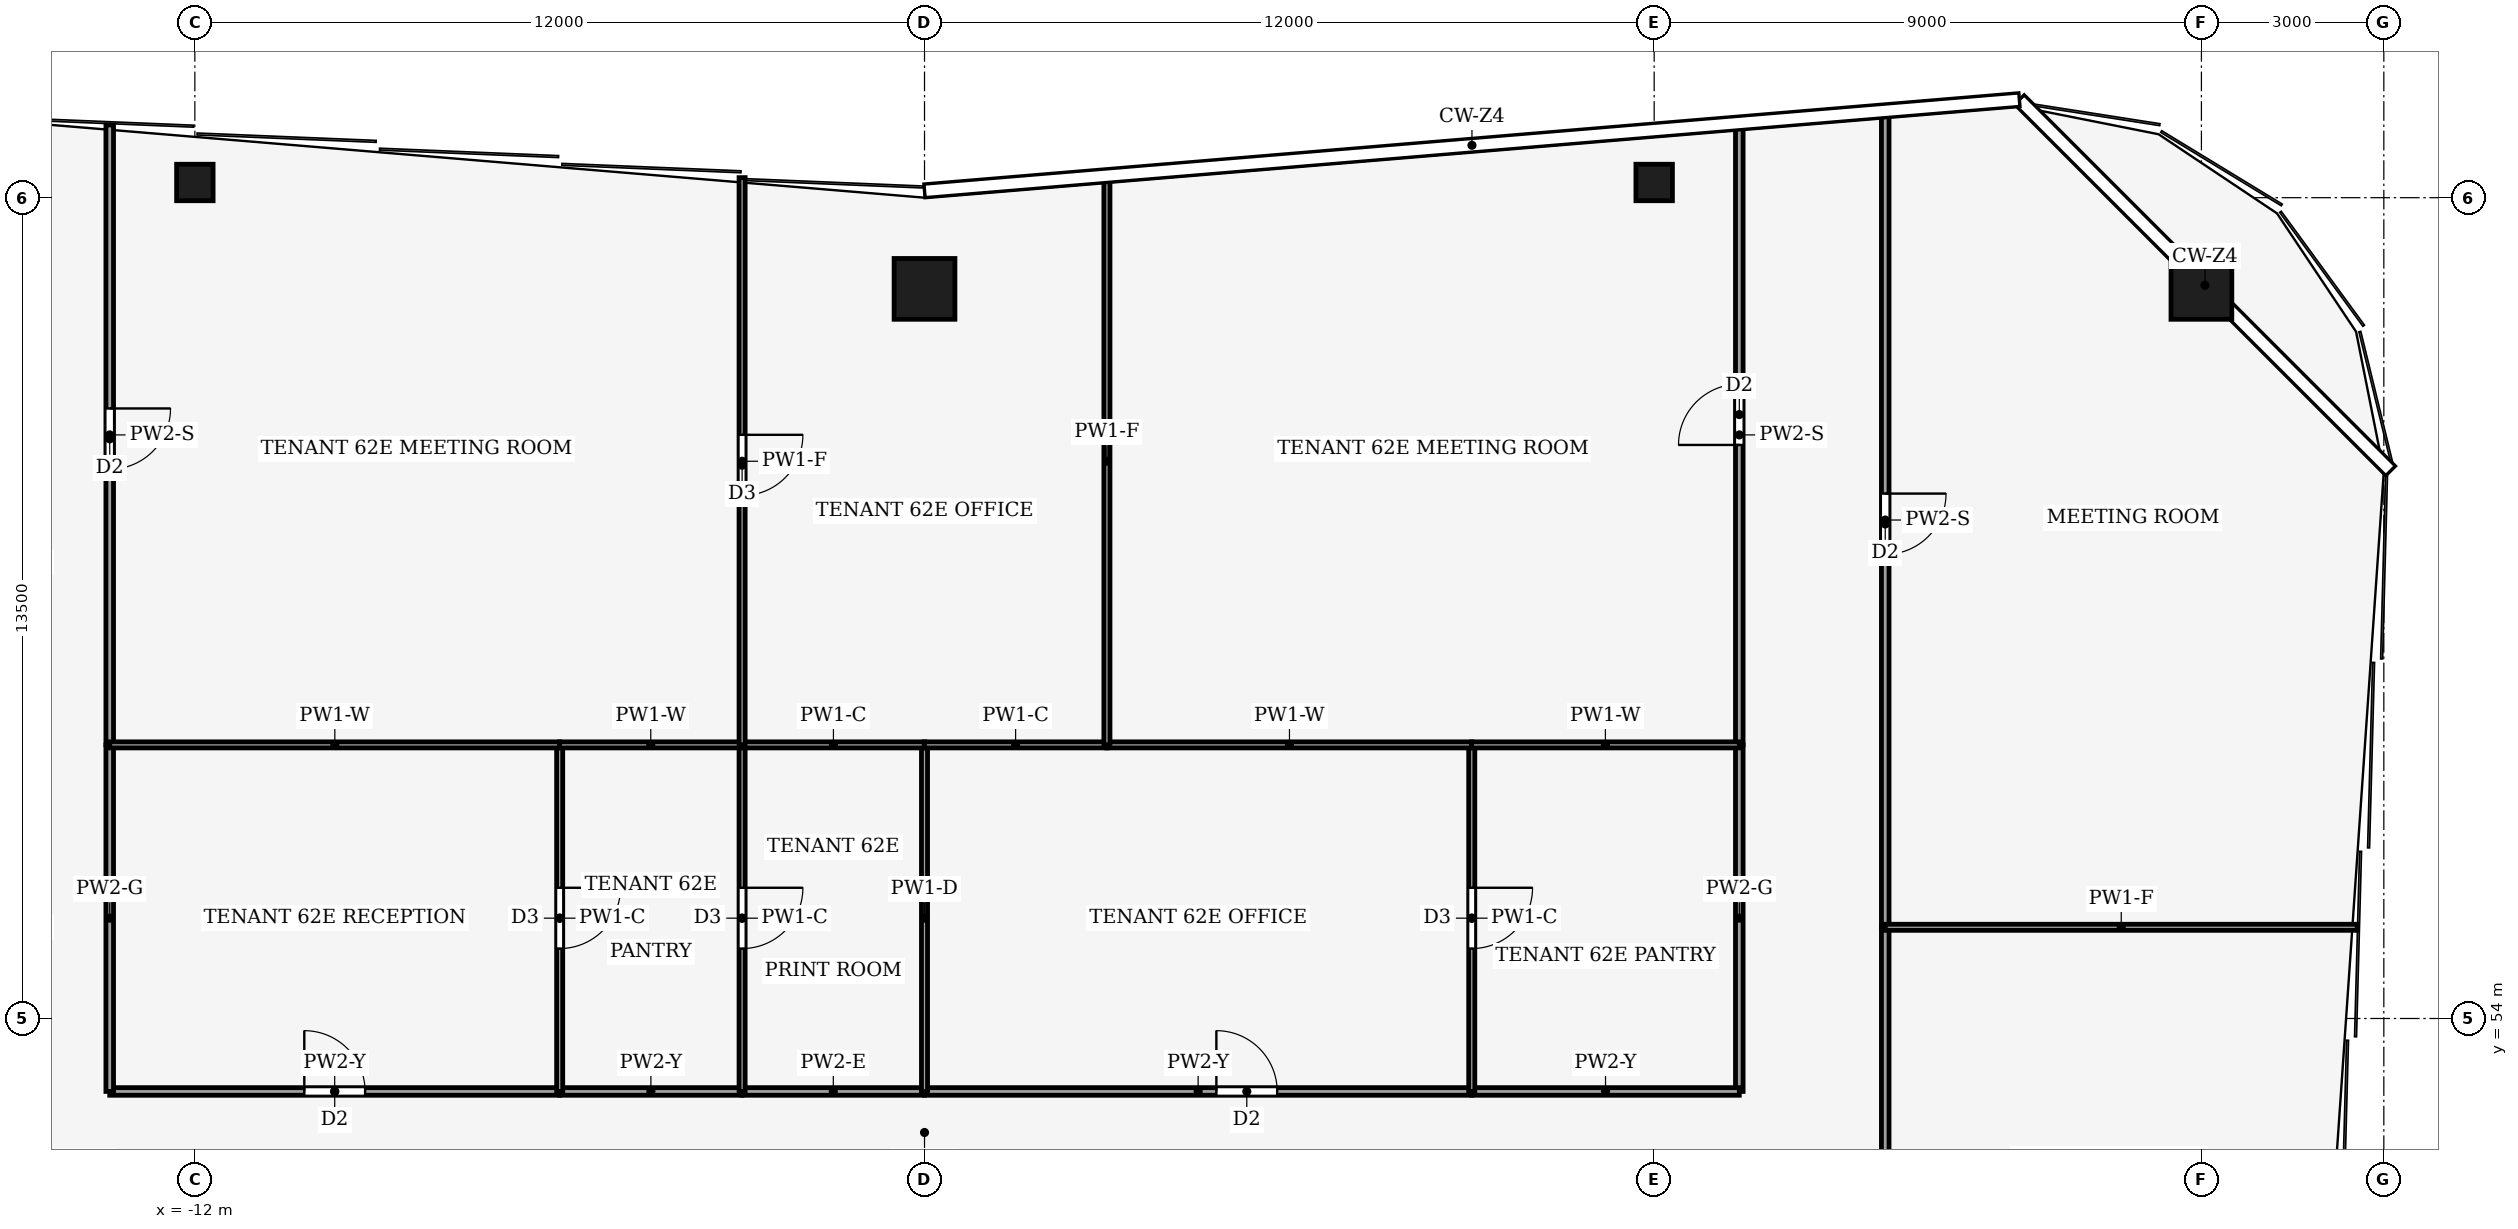
"""IFC4 building model, lengths in metres.
Left out: names, types, materials, properties, quantities, classifications, styles, units other than length and angle.
Written with IfcOpenShell. Run it as: python <this file> out.ifc"""

import sys

from ifc_helpers import new_model, si_unit, direction, frame, frame_2d, origin, origin_2d, place, context, subcontext, project, spatial, rectangle, hollow_rectangle, extrude, element, fill, save


model = new_model("IFC4")
c1 = context("Model", 3, precision=1e-05, world=origin(), true_north=direction((0.0, 1.0)))
c2 = subcontext(c1, "Body", "Model", "MODEL_VIEW")
j1 = project(units=[si_unit("LENGTHUNIT", "METRE"), si_unit("PLANEANGLEUNIT", "RADIAN")], contexts=[c1])
p1 = place(None, origin())
s1 = spatial("IfcSite", under=j1, at=p1, CompositionType="ELEMENT")
p2 = place(p1, origin())
s2 = spatial("IfcBuilding", under=s1, at=p2, CompositionType="ELEMENT")
p3 = place(p2, frame((0.0, 0.0, 270.0)))
s3 = spatial("IfcBuildingStorey", under=s2, at=p3, CompositionType="ELEMENT", Elevation=270.0)
for number, where, z_axis, x_axis in (
    (1, (0.0, 66.0, 0.0), (0.0, 0.0, 1.0), (1.0, 0.0, 0.0)),
    (2, (21.0, 66.0, 0.0), (0.0, 0.0, 1.0), (1.0, 0.0, 0.0)),
):
    element("IfcColumn", number, at=place(p3, frame(where, z_axis=z_axis, x_axis=x_axis)), inside=s3, PredefinedType="COLUMN", context=c2, shape_type="SweptSolid", body=[
        extrude(hollow_rectangle(XDim=1.0, YDim=1.0, WallThickness=0.045, at=origin_2d()), origin(), (0.0, 0.0, 1.0), 4.0),
    ])
for number, where, z_axis, x_axis in (
    (3, (-12.0, 67.75, 0.0), (0.0, 0.0, 1.0), (1.0, 0.0, 0.0)),
    (4, (12.0, 67.75, 0.0), (0.0, 0.0, 1.0), (1.0, 0.0, 0.0)),
):
    element("IfcColumn", number, at=place(p3, frame(where, z_axis=z_axis, x_axis=x_axis)), inside=s3, PredefinedType="COLUMN", context=c2, shape_type="SweptSolid", body=[
        extrude(hollow_rectangle(XDim=0.6, YDim=0.6, WallThickness=0.025, at=origin_2d()), origin(), (0.0, 0.0, 1.0), 4.0),
    ])
p4 = place(p3, frame((15.8, 55.5, 0.0), z_axis=(0.0, 0.0, 1.0), x_axis=(0.0, -1.0, 0.0)))
e5 = element("IfcWall", 5, at=p4, inside=s3, PredefinedType="PARTITIONING", context=c2, shape_type="SweptSolid", body=[
    extrude(rectangle(XDim=9.0, YDim=0.125, at=frame_2d((4.5, 0.0))), origin(), (0.0, 0.0, 1.0), 3.24),
])
p5 = place(p4, frame((4.0, 0.0, 0.0)))
e6 = element("IfcOpeningElement", 6, at=p5, cuts=e5, PredefinedType="OPENING", context=c2, shape_type="SweptSolid", body=[
    extrude(rectangle(XDim=1.0, YDim=2.1, at=frame_2d((0.5, 1.05))), frame((0.0, 0.073, 0.0), z_axis=(0.0, -1.0, 0.0), x_axis=(1.0, 0.0, 0.0)), (0.0, 0.0, 1.0), 0.145),
])
p6 = place(p3, frame((15.8, 68.897, 0.0), z_axis=(0.0, 0.0, 1.0), x_axis=(0.0, -1.0, 0.0)))
e7 = element("IfcWall", 7, at=p6, inside=s3, PredefinedType="PARTITIONING", context=c2, shape_type="SweptSolid", body=[
    extrude(rectangle(XDim=13.397, YDim=0.125, at=frame_2d((6.698, 0.0))), origin(), (0.0, 0.0, 1.0), 3.04),
])
p7 = place(p6, frame((6.263, 0.0, 0.0)))
e8 = element("IfcOpeningElement", 8, at=p7, cuts=e7, PredefinedType="OPENING", context=c2, shape_type="SweptSolid", body=[
    extrude(rectangle(XDim=1.0, YDim=2.1, at=frame_2d((0.5, 1.05))), frame((0.0, 0.073, 0.0), z_axis=(0.0, -1.0, 0.0), x_axis=(1.0, 0.0, 0.0)), (0.0, 0.0, 1.0), 0.145),
])
p8 = place(p3, frame((-13.4, 52.8, 0.0), z_axis=(0.0, 0.0, 1.0), x_axis=(1.0, 0.0, 0.0)))
e9 = element("IfcWall", 9, at=p8, inside=s3, PredefinedType="PARTITIONING", context=c2, shape_type="SweptSolid", body=[
    extrude(rectangle(XDim=7.4, YDim=0.125, at=frame_2d((3.7, 0.0))), origin(), (0.0, 0.0, 1.0), 3.24),
])
p9 = place(p8, frame((3.2, 0.0, 0.0)))
e10 = element("IfcOpeningElement", 10, at=p9, cuts=e9, PredefinedType="OPENING", context=c2, shape_type="SweptSolid", body=[
    extrude(rectangle(XDim=1.0, YDim=2.1, at=frame_2d((0.5, 1.05))), frame((0.0, 0.073, 0.0), z_axis=(0.0, -1.0, 0.0), x_axis=(1.0, 0.0, 0.0)), (0.0, 0.0, 1.0), 0.145),
])
p10 = place(p3, frame((-13.4, 52.8, 0.0), z_axis=(0.0, 0.0, 1.0), x_axis=(0.0, 1.0, 0.0)))
e11 = element("IfcWall", 11, at=p10, inside=s3, PredefinedType="PARTITIONING", context=c2, shape_type="SweptSolid", body=[
    extrude(rectangle(XDim=5.7, YDim=0.125, at=frame_2d((2.85, 0.0))), origin(), (0.0, 0.0, 1.0), 3.87),
])
p11 = place(p3, frame((-3.0, 52.8, 0.0), z_axis=(0.0, 0.0, 1.0), x_axis=(-1.0, 0.0, 0.0)))
e12 = element("IfcWall", 12, at=p11, inside=s3, PredefinedType="PARTITIONING", context=c2, shape_type="SweptSolid", body=[
    extrude(rectangle(XDim=3.0, YDim=0.125, at=frame_2d((1.5, 0.0))), origin(), (0.0, 0.0, 1.0), 3.24),
])
p12 = place(p3, frame((0.0, 52.8, 0.0), z_axis=(0.0, 0.0, 1.0), x_axis=(-1.0, 0.0, 0.0)))
e13 = element("IfcWall", 13, at=p12, inside=s3, PredefinedType="PARTITIONING", context=c2, shape_type="SweptSolid", body=[
    extrude(rectangle(XDim=3.0, YDim=0.125, at=frame_2d((1.5, 0.0))), origin(), (0.0, 0.0, 1.0), 3.29),
])
p13 = place(p3, frame((0.0, 52.8, 0.0), z_axis=(0.0, 0.0, 1.0), x_axis=(1.0, 0.0, 0.0)))
e14 = element("IfcWall", 14, at=p13, inside=s3, PredefinedType="PARTITIONING", context=c2, shape_type="SweptSolid", body=[
    extrude(rectangle(XDim=9.0, YDim=0.125, at=frame_2d((4.5, 0.0))), origin(), (0.0, 0.0, 1.0), 3.24),
])
p14 = place(p13, frame((4.8, 0.0, 0.0)))
e15 = element("IfcOpeningElement", 15, at=p14, cuts=e14, PredefinedType="OPENING", context=c2, shape_type="SweptSolid", body=[
    extrude(rectangle(XDim=1.0, YDim=2.1, at=frame_2d((0.5, 1.05))), frame((0.0, 0.073, 0.0), z_axis=(0.0, -1.0, 0.0), x_axis=(1.0, 0.0, 0.0)), (0.0, 0.0, 1.0), 0.145),
])
p15 = place(p3, frame((13.4, 52.8, 0.0), z_axis=(0.0, 0.0, 1.0), x_axis=(0.0, 1.0, 0.0)))
e16 = element("IfcWall", 16, at=p15, inside=s3, PredefinedType="PARTITIONING", context=c2, shape_type="SweptSolid", body=[
    extrude(rectangle(XDim=5.7, YDim=0.125, at=frame_2d((2.85, 0.0))), origin(), (0.0, 0.0, 1.0), 3.87),
])
p16 = place(p3, frame((13.4, 52.8, 0.0), z_axis=(0.0, 0.0, 1.0), x_axis=(-1.0, 0.0, 0.0)))
e17 = element("IfcWall", 17, at=p16, inside=s3, PredefinedType="PARTITIONING", context=c2, shape_type="SweptSolid", body=[
    extrude(rectangle(XDim=4.4, YDim=0.125, at=frame_2d((2.2, 0.0))), origin(), (0.0, 0.0, 1.0), 3.24),
])
p17 = place(p3, frame((-13.4, 68.697, 0.0), z_axis=(0.0, 0.0, 1.0), x_axis=(0.0, -1.0, 0.0)))
e18 = element("IfcWall", 18, at=p17, inside=s3, PredefinedType="PARTITIONING", context=c2, shape_type="SweptSolid", body=[
    extrude(rectangle(XDim=10.197, YDim=0.125, at=frame_2d((5.098, 0.0))), origin(), (0.0, 0.0, 1.0), 3.04),
])
p18 = place(p17, frame((4.663, 0.0, 0.0)))
e19 = element("IfcOpeningElement", 19, at=p18, cuts=e18, PredefinedType="OPENING", context=c2, shape_type="SweptSolid", body=[
    extrude(rectangle(XDim=1.0, YDim=2.1, at=frame_2d((0.5, 1.05))), frame((0.0, 0.073, 0.0), z_axis=(0.0, -1.0, 0.0), x_axis=(1.0, 0.0, 0.0)), (0.0, 0.0, 1.0), 0.145),
])
p19 = place(p3, frame((13.4, 58.5, 0.0), z_axis=(0.0, 0.0, 1.0), x_axis=(0.0, 1.0, 0.0)))
e20 = element("IfcWall", 20, at=p19, inside=s3, PredefinedType="PARTITIONING", context=c2, shape_type="SweptSolid", body=[
    extrude(rectangle(XDim=10.197, YDim=0.125, at=frame_2d((5.098, 0.0))), origin(), (0.0, 0.0, 1.0), 3.04),
])
p20 = place(p19, frame((4.933, 0.0, 0.0)))
e21 = element("IfcOpeningElement", 21, at=p20, cuts=e20, PredefinedType="OPENING", context=c2, shape_type="SweptSolid", body=[
    extrude(rectangle(XDim=1.0, YDim=2.1, at=frame_2d((0.5, 1.05))), frame((0.0, 0.073, 0.0), z_axis=(0.0, -1.0, 0.0), x_axis=(1.0, 0.0, 0.0)), (0.0, 0.0, 1.0), 0.145),
])
p21 = place(p3, frame((23.563, 55.5, 0.0), z_axis=(0.0, 0.0, 1.0), x_axis=(-1.0, 0.0, 0.0)))
e22 = element("IfcWall", 22, at=p21, inside=s3, PredefinedType="PARTITIONING", context=c2, shape_type="SweptSolid", body=[
    extrude(rectangle(XDim=7.763, YDim=0.1, at=frame_2d((3.881, 0.0))), origin(), (0.0, 0.0, 1.0), 3.04),
])
p22 = place(p3, frame((-6.0, 58.5, 0.0), z_axis=(0.0, 0.0, 1.0), x_axis=(0.0, -1.0, 0.0)))
e23 = element("IfcWall", 23, at=p22, inside=s3, PredefinedType="PARTITIONING", context=c2, shape_type="SweptSolid", body=[
    extrude(rectangle(XDim=5.7, YDim=0.1, at=frame_2d((2.85, 0.0))), origin(), (0.0, 0.0, 1.0), 3.87),
])
p23 = place(p22, frame((2.35, 0.0, 0.0)))
e24 = element("IfcOpeningElement", 24, at=p23, cuts=e23, PredefinedType="OPENING", context=c2, shape_type="SweptSolid", body=[
    extrude(rectangle(XDim=1.0, YDim=2.1, at=frame_2d((0.5, 1.05))), frame((0.0, 0.06, 0.0), z_axis=(0.0, -1.0, 0.0), x_axis=(1.0, 0.0, 0.0)), (0.0, 0.0, 1.0), 0.12),
])
p24 = place(p3, frame((-5.996, 58.5, 0.0), z_axis=(0.0, 0.0, 1.0), x_axis=(-1.0, 0.0, 0.0)))
e25 = element("IfcWall", 25, at=p24, inside=s3, PredefinedType="PARTITIONING", context=c2, shape_type="SweptSolid", body=[
    extrude(rectangle(XDim=7.404, YDim=0.1, at=frame_2d((3.702, 0.0))), origin(), (0.0, 0.0, 1.0), 3.24),
])
p25 = place(p3, frame((-3.0, 58.5, 0.0), z_axis=(0.0, 0.0, 1.0), x_axis=(0.0, -1.0, 0.0)))
e26 = element("IfcWall", 26, at=p25, inside=s3, PredefinedType="PARTITIONING", context=c2, shape_type="SweptSolid", body=[
    extrude(rectangle(XDim=5.7, YDim=0.1, at=frame_2d((2.85, 0.0))), origin(), (0.0, 0.0, 1.0), 3.87),
])
p26 = place(p25, frame((2.35, 0.0, 0.0)))
e27 = element("IfcOpeningElement", 27, at=p26, cuts=e26, PredefinedType="OPENING", context=c2, shape_type="SweptSolid", body=[
    extrude(rectangle(XDim=1.0, YDim=2.1, at=frame_2d((0.5, 1.05))), frame((0.0, 0.06, 0.0), z_axis=(0.0, -1.0, 0.0), x_axis=(1.0, 0.0, 0.0)), (0.0, 0.0, 1.0), 0.12),
])
p27 = place(p3, frame((-3.0, 58.5, 0.0), z_axis=(0.0, 0.0, 1.0), x_axis=(-1.0, 0.0, 0.0)))
e28 = element("IfcWall", 28, at=p27, inside=s3, PredefinedType="PARTITIONING", context=c2, shape_type="SweptSolid", body=[
    extrude(rectangle(XDim=3.004, YDim=0.1, at=frame_2d((1.502, 0.0))), origin(), (0.0, 0.0, 1.0), 3.24),
])
p28 = place(p3, frame((0.0, 52.8, 0.0), z_axis=(0.0, 0.0, 1.0), x_axis=(0.0, 1.0, 0.0)))
e29 = element("IfcWall", 29, at=p28, inside=s3, PredefinedType="PARTITIONING", context=c2, shape_type="SweptSolid", body=[
    extrude(rectangle(XDim=5.7, YDim=0.1, at=frame_2d((2.85, 0.0))), origin(), (0.0, 0.0, 1.0), 3.29),
])
p29 = place(p3, frame((0.004, 58.5, 0.0), z_axis=(0.0, 0.0, 1.0), x_axis=(-1.0, 0.0, 0.0)))
e30 = element("IfcWall", 30, at=p29, inside=s3, PredefinedType="PARTITIONING", context=c2, shape_type="SweptSolid", body=[
    extrude(rectangle(XDim=3.004, YDim=0.1, at=frame_2d((1.502, 0.0))), origin(), (0.0, 0.0, 1.0), 3.87),
])
p30 = place(p3, frame((9.0, 58.5, 0.0), z_axis=(0.0, 0.0, 1.0), x_axis=(0.0, -1.0, 0.0)))
e31 = element("IfcWall", 31, at=p30, inside=s3, PredefinedType="PARTITIONING", context=c2, shape_type="SweptSolid", body=[
    extrude(rectangle(XDim=5.7, YDim=0.1, at=frame_2d((2.85, 0.0))), origin(), (0.0, 0.0, 1.0), 3.87),
])
p31 = place(p30, frame((2.35, 0.0, 0.0)))
e32 = element("IfcOpeningElement", 32, at=p31, cuts=e31, PredefinedType="OPENING", context=c2, shape_type="SweptSolid", body=[
    extrude(rectangle(XDim=1.0, YDim=2.1, at=frame_2d((0.5, 1.05))), frame((0.0, 0.06, 0.0), z_axis=(0.0, -1.0, 0.0), x_axis=(1.0, 0.0, 0.0)), (0.0, 0.0, 1.0), 0.12),
])
p32 = place(p3, frame((3.0, 58.5, 0.0), z_axis=(0.0, 0.0, 1.0), x_axis=(-1.0, 0.0, 0.0)))
e33 = element("IfcWall", 33, at=p32, inside=s3, PredefinedType="PARTITIONING", context=c2, shape_type="SweptSolid", body=[
    extrude(rectangle(XDim=3.004, YDim=0.1, at=frame_2d((1.502, 0.0))), origin(), (0.0, 0.0, 1.0), 3.87),
])
p33 = place(p3, frame((9.004, 58.5, 0.0), z_axis=(0.0, 0.0, 1.0), x_axis=(-1.0, 0.0, 0.0)))
e34 = element("IfcWall", 34, at=p33, inside=s3, PredefinedType="PARTITIONING", context=c2, shape_type="SweptSolid", body=[
    extrude(rectangle(XDim=6.004, YDim=0.1, at=frame_2d((3.002, 0.0))), origin(), (0.0, 0.0, 1.0), 3.24),
])
p34 = place(p3, frame((13.4, 58.5, 0.0), z_axis=(0.0, 0.0, 1.0), x_axis=(-1.0, 0.0, 0.0)))
e35 = element("IfcWall", 35, at=p34, inside=s3, PredefinedType="PARTITIONING", context=c2, shape_type="SweptSolid", body=[
    extrude(rectangle(XDim=4.404, YDim=0.1, at=frame_2d((2.202, 0.0))), origin(), (0.0, 0.0, 1.0), 3.24),
])
p35 = place(p3, frame((-3.0, 67.83, 0.0), z_axis=(0.0, 0.0, 1.0), x_axis=(0.0, -1.0, 0.0)))
e36 = element("IfcWall", 36, at=p35, inside=s3, PredefinedType="PARTITIONING", context=c2, shape_type="SweptSolid", body=[
    extrude(rectangle(XDim=9.33, YDim=0.1, at=frame_2d((4.665, 0.0))), origin(), (0.0, 0.0, 1.0), 3.04),
])
p36 = place(p35, frame((4.23, 0.0, 0.0)))
e37 = element("IfcOpeningElement", 37, at=p36, cuts=e36, PredefinedType="OPENING", context=c2, shape_type="SweptSolid", body=[
    extrude(rectangle(XDim=1.0, YDim=2.1, at=frame_2d((0.5, 1.05))), frame((0.0, 0.06, 0.0), z_axis=(0.0, -1.0, 0.0), x_axis=(1.0, 0.0, 0.0)), (0.0, 0.0, 1.0), 0.12),
])
p37 = place(p3, frame((3.0, 58.5, 0.0), z_axis=(0.0, 0.0, 1.0), x_axis=(0.0, 1.0, 0.0)))
e38 = element("IfcWall", 38, at=p37, inside=s3, PredefinedType="PARTITIONING", context=c2, shape_type="SweptSolid", body=[
    extrude(rectangle(XDim=9.33, YDim=0.1, at=frame_2d((4.665, 0.0))), origin(), (0.0, 0.0, 1.0), 3.04),
])
p38 = place(p7, origin())
e39 = element("IfcDoor", 39, at=p38, inside=s3, OperationType="SINGLE_SWING_RIGHT", PredefinedType="DOOR", context=c2, shape_type="SweptSolid", body=[
    extrude(rectangle(XDim=1.0, YDim=2.1, at=frame_2d((0.5, 1.05))), frame((0.0, 0.025, 0.0), z_axis=(0.0, -1.0, 0.0), x_axis=(1.0, 0.0, 0.0)), (0.0, 0.0, 1.0), 0.05),
])
fill(e8, e39)
p39 = place(p9, origin())
e40 = element("IfcDoor", 40, at=p39, inside=s3, OperationType="SINGLE_SWING_LEFT", PredefinedType="DOOR", context=c2, shape_type="SweptSolid", body=[
    extrude(rectangle(XDim=1.0, YDim=2.1, at=frame_2d((0.5, 1.05))), frame((0.0, 0.025, 0.0), z_axis=(0.0, -1.0, 0.0), x_axis=(1.0, 0.0, 0.0)), (0.0, 0.0, 1.0), 0.05),
])
fill(e10, e40)
p40 = place(p14, origin())
e41 = element("IfcDoor", 41, at=p40, inside=s3, OperationType="SINGLE_SWING_RIGHT", PredefinedType="DOOR", context=c2, shape_type="SweptSolid", body=[
    extrude(rectangle(XDim=1.0, YDim=2.1, at=frame_2d((0.5, 1.05))), frame((0.0, 0.025, 0.0), z_axis=(0.0, -1.0, 0.0), x_axis=(1.0, 0.0, 0.0)), (0.0, 0.0, 1.0), 0.05),
])
fill(e15, e41)
p41 = place(p18, origin())
e42 = element("IfcDoor", 42, at=p41, inside=s3, OperationType="SINGLE_SWING_RIGHT", PredefinedType="DOOR", context=c2, shape_type="SweptSolid", body=[
    extrude(rectangle(XDim=1.0, YDim=2.1, at=frame_2d((0.5, 1.05))), frame((0.0, 0.025, 0.0), z_axis=(0.0, -1.0, 0.0), x_axis=(1.0, 0.0, 0.0)), (0.0, 0.0, 1.0), 0.05),
])
fill(e19, e42)
p42 = place(p20, origin())
e43 = element("IfcDoor", 43, at=p42, inside=s3, OperationType="SINGLE_SWING_RIGHT", PredefinedType="DOOR", context=c2, shape_type="SweptSolid", body=[
    extrude(rectangle(XDim=1.0, YDim=2.1, at=frame_2d((0.5, 1.05))), frame((0.0, 0.025, 0.0), z_axis=(0.0, -1.0, 0.0), x_axis=(1.0, 0.0, 0.0)), (0.0, 0.0, 1.0), 0.05),
])
fill(e21, e43)
p43 = place(p23, origin())
e44 = element("IfcDoor", 44, at=p43, inside=s3, OperationType="SINGLE_SWING_RIGHT", PredefinedType="DOOR", context=c2, shape_type="SweptSolid", body=[
    extrude(rectangle(XDim=1.0, YDim=2.1, at=frame_2d((0.5, 1.05))), frame((0.0, 0.025, 0.0), z_axis=(0.0, -1.0, 0.0), x_axis=(1.0, 0.0, 0.0)), (0.0, 0.0, 1.0), 0.05),
])
fill(e24, e44)
p44 = place(p26, origin())
e45 = element("IfcDoor", 45, at=p44, inside=s3, OperationType="SINGLE_SWING_LEFT", PredefinedType="DOOR", context=c2, shape_type="SweptSolid", body=[
    extrude(rectangle(XDim=1.0, YDim=2.1, at=frame_2d((0.5, 1.05))), frame((0.0, 0.025, 0.0), z_axis=(0.0, -1.0, 0.0), x_axis=(1.0, 0.0, 0.0)), (0.0, 0.0, 1.0), 0.05),
])
fill(e27, e45)
p45 = place(p31, origin())
e46 = element("IfcDoor", 46, at=p45, inside=s3, OperationType="SINGLE_SWING_RIGHT", PredefinedType="DOOR", context=c2, shape_type="SweptSolid", body=[
    extrude(rectangle(XDim=1.0, YDim=2.1, at=frame_2d((0.5, 1.05))), frame((0.0, 0.025, 0.0), z_axis=(0.0, -1.0, 0.0), x_axis=(1.0, 0.0, 0.0)), (0.0, 0.0, 1.0), 0.05),
])
fill(e32, e46)
p46 = place(p36, origin())
e47 = element("IfcDoor", 47, at=p46, inside=s3, OperationType="SINGLE_SWING_RIGHT", PredefinedType="DOOR", context=c2, shape_type="SweptSolid", body=[
    extrude(rectangle(XDim=1.0, YDim=2.1, at=frame_2d((0.5, 1.05))), frame((0.0, 0.025, 0.0), z_axis=(0.0, -1.0, 0.0), x_axis=(1.0, 0.0, 0.0)), (0.0, 0.0, 1.0), 0.05),
])
fill(e37, e47)
save(model, sys.argv[1])
